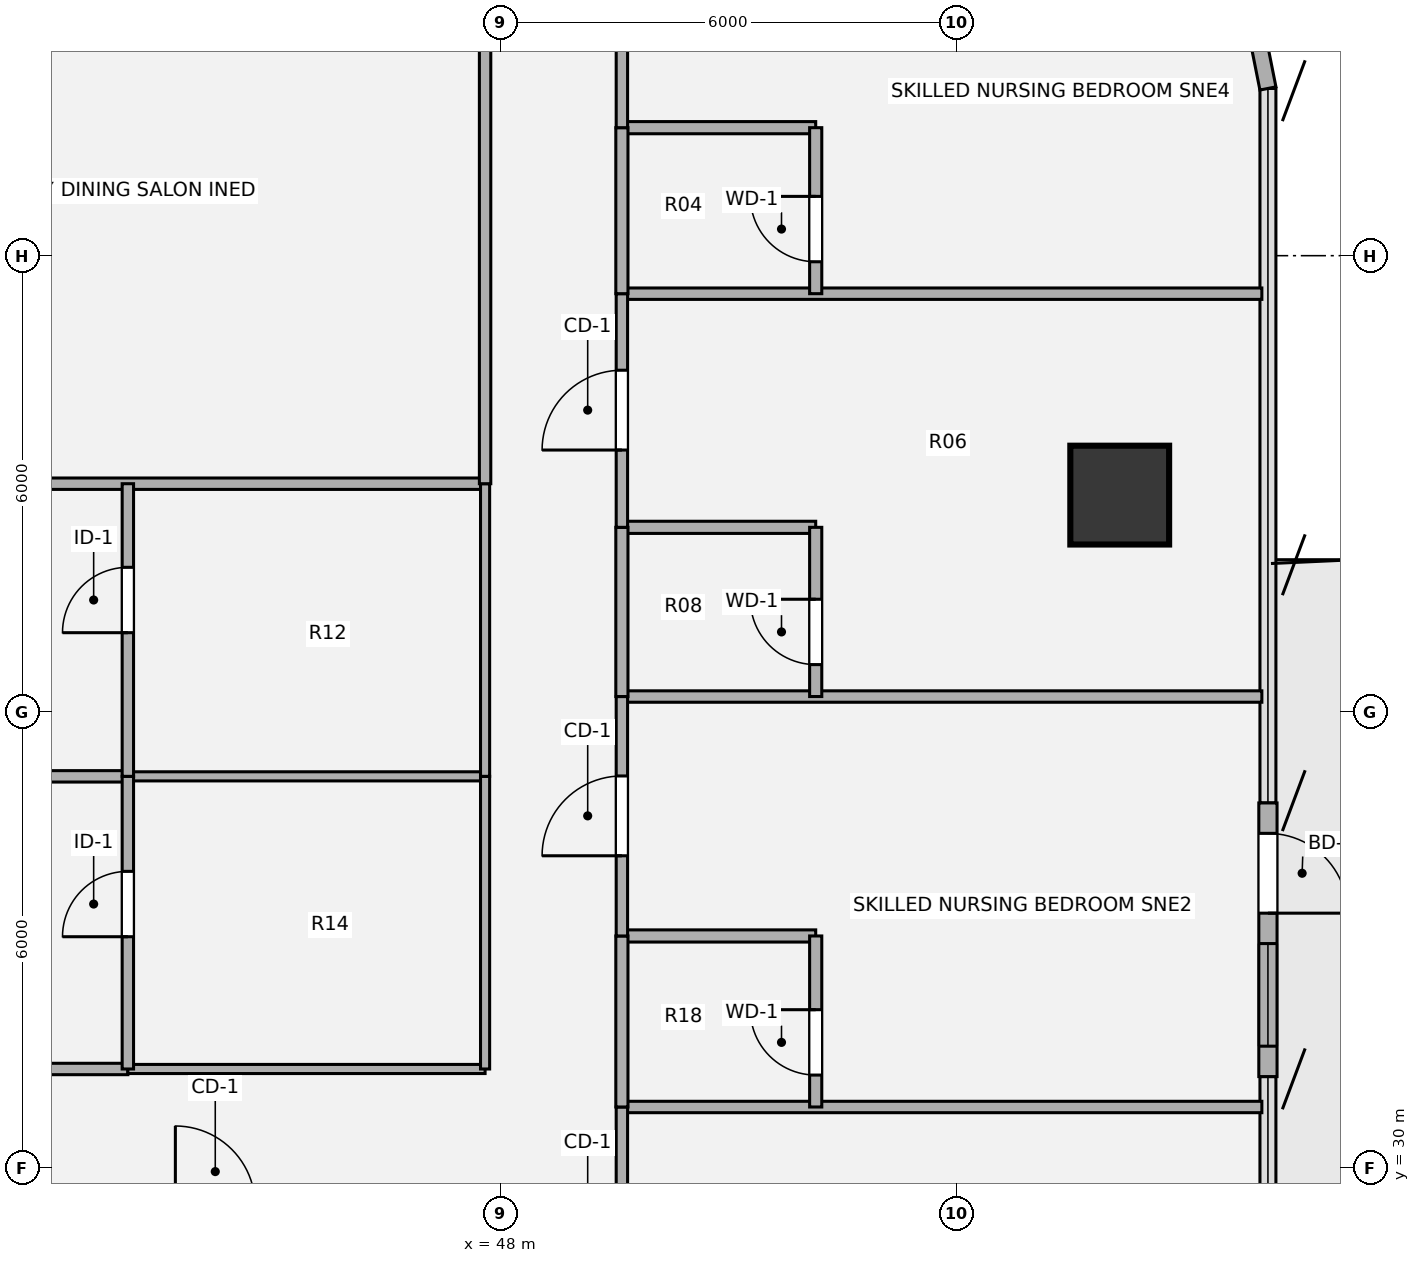
"""IFC4 building model, lengths in metres.
Left out: names, types, materials, properties, quantities, classifications, styles, units other than length and angle.
Written with IfcOpenShell. Run it as: python <this file> out.ifc"""

import sys

from ifc_helpers import new_model, si_unit, direction, frame, frame_2d, origin, origin_2d, place, context, subcontext, project, spatial, rectangle, hollow_circle, extrude, source, transform, mapped, element, fill, save


model = new_model("IFC4")
c1 = context("Model", 3, precision=1e-05, world=origin(), true_north=direction((0.0, 1.0)))
c2 = subcontext(c1, "Body", "Model", "MODEL_VIEW")
j1 = project(units=[si_unit("LENGTHUNIT", "METRE"), si_unit("PLANEANGLEUNIT", "RADIAN")], contexts=[c1])
p1 = place(None, origin())
s1 = spatial("IfcSite", under=j1, at=p1, CompositionType="ELEMENT")
p2 = place(p1, origin())
s2 = spatial("IfcBuilding", under=s1, at=p2, CompositionType="ELEMENT")
p3 = place(p2, frame((0.0, 0.0, 131.4)))
s3 = spatial("IfcBuildingStorey", under=s2, at=p3, CompositionType="ELEMENT", Elevation=131.4)
m1 = source(origin(), c2, "Body", "SweptSolid", [
    extrude(hollow_circle(Radius=0.65, WallThickness=0.045, at=origin_2d()), origin(), (0.0, 0.0, 1.0), 3.78),
])
p4 = place(p3, frame((56.15, 38.85, 0.0), z_axis=(0.0, 0.0, 1.0), x_axis=(1.0, 0.0, 0.0)))
e1 = element("IfcColumn", 1, at=p4, inside=s3, PredefinedType="COLUMN", context=c2, shape_type="MappedRepresentation", body=[
    mapped(m1, transform((0.0, 0.0, 0.0), x_axis=(1.0, 0.0, 0.0), y_axis=(0.0, 1.0, 0.0), z_axis=(0.0, 0.0, 1.0), scale=1.0)),
])
p5 = place(p3, frame((57.856, 45.425, 0.0), z_axis=(0.0, 0.0, 1.0), x_axis=(0.195138390419, -0.980775717779, 0.0)))
e2 = element("IfcWall", 2, at=p5, inside=s3, PredefinedType="SOLIDWALL", context=c2, shape_type="SweptSolid", body=[
    extrude(rectangle(XDim=1.249, YDim=0.215, at=frame_2d((0.624, 0.0))), origin(), (0.0, 0.0, 1.0), 3.53),
])
p6 = place(p3, frame((58.1, 34.8, 0.0), z_axis=(0.0, 0.0, 1.0), x_axis=(0.0, -1.0, 0.0)))
e3 = element("IfcWall", 3, at=p6, inside=s3, PredefinedType="SOLIDWALL", context=c2, shape_type="SweptSolid", body=[
    extrude(rectangle(XDim=3.6, YDim=0.24, at=frame_2d((1.8, 0.0))), origin(), (0.0, 0.0, 1.0), 3.53),
])
p7 = place(p6, frame((0.4, 0.0, 0.0)))
e4 = element("IfcOpeningElement", 4, at=p7, cuts=e3, PredefinedType="OPENING", context=c2, shape_type="SweptSolid", body=[
    extrude(rectangle(XDim=1.05, YDim=2.15, at=origin_2d()), frame((0.525, 0.13, 1.075), z_axis=(0.0, -1.0, 0.0), x_axis=(1.0, 0.0, 0.0)), (0.0, 0.0, 1.0), 0.26),
])
p8 = place(p6, frame((1.85, 0.0, 0.85)))
e5 = element("IfcOpeningElement", 5, at=p8, cuts=e3, PredefinedType="OPENING", context=c2, shape_type="SweptSolid", body=[
    extrude(rectangle(XDim=1.35, YDim=1.35, at=origin_2d()), frame((0.675, 0.13, 0.675), z_axis=(0.0, -1.0, 0.0), x_axis=(1.0, 0.0, 0.0)), (0.0, 0.0, 1.0), 0.26),
])
p9 = place(p3, frame((49.6, 30.8, 0.0), z_axis=(0.0, 0.0, 1.0), x_axis=(1.0, 0.0, 0.0)))
e6 = element("IfcWall", 6, at=p9, inside=s3, PredefinedType="PARTITIONING", context=c2, shape_type="SweptSolid", body=[
    extrude(rectangle(XDim=8.42, YDim=0.15, at=frame_2d((4.21, 0.0))), origin(), (0.0, 0.0, 1.0), 2.982),
])
p10 = place(p3, frame((36.9, 31.3, 0.0), z_axis=(0.0, 0.0, 1.0), x_axis=(1.0, 0.0, 0.0)))
e7 = element("IfcWall", 7, at=p10, inside=s3, PredefinedType="PARTITIONING", context=c2, shape_type="SweptSolid", body=[
    extrude(rectangle(XDim=6.2, YDim=0.15, at=frame_2d((3.1, 0.0))), origin(), (0.0, 0.0, 1.0), 2.982),
])
p11 = place(p3, frame((43.1, 31.3, 0.0), z_axis=(0.0, 0.0, 1.0), x_axis=(1.0, 0.0, 0.0)))
e8 = element("IfcWall", 8, at=p11, inside=s3, PredefinedType="PARTITIONING", context=c2, shape_type="SweptSolid", body=[
    extrude(rectangle(XDim=4.7, YDim=0.12, at=frame_2d((2.35, 0.0))), origin(), (0.0, 0.0, 1.0), 2.982),
])
p12 = place(p3, frame((49.6, 33.05, 0.0), z_axis=(0.0, 0.0, 1.0), x_axis=(1.0, 0.0, 0.0)))
e9 = element("IfcWall", 9, at=p12, inside=s3, PredefinedType="PLUMBINGWALL", context=c2, shape_type="SweptSolid", body=[
    extrude(rectangle(XDim=2.55, YDim=0.16, at=frame_2d((1.275, 0.0))), origin(), (0.0, 0.0, 1.0), 2.982),
])
p13 = place(p3, frame((36.9, 35.15, 0.0), z_axis=(0.0, 0.0, 1.0), x_axis=(1.0, 0.0, 0.0)))
e10 = element("IfcWall", 10, at=p13, inside=s3, PredefinedType="PARTITIONING", context=c2, shape_type="SweptSolid", body=[
    extrude(rectangle(XDim=6.2, YDim=0.15, at=frame_2d((3.1, 0.0))), origin(), (0.0, 0.0, 1.0), 2.982),
])
p14 = place(p3, frame((43.1, 35.15, 0.0), z_axis=(0.0, 0.0, 1.0), x_axis=(1.0, 0.0, 0.0)))
e11 = element("IfcWall", 11, at=p14, inside=s3, PredefinedType="PARTITIONING", context=c2, shape_type="SweptSolid", body=[
    extrude(rectangle(XDim=4.7, YDim=0.12, at=frame_2d((2.35, 0.0))), origin(), (0.0, 0.0, 1.0), 2.982),
])
p15 = place(p3, frame((49.6, 36.2, 0.0), z_axis=(0.0, 0.0, 1.0), x_axis=(1.0, 0.0, 0.0)))
e12 = element("IfcWall", 12, at=p15, inside=s3, PredefinedType="PARTITIONING", context=c2, shape_type="SweptSolid", body=[
    extrude(rectangle(XDim=8.42, YDim=0.15, at=frame_2d((4.21, 0.0))), origin(), (0.0, 0.0, 1.0), 2.982),
])
p16 = place(p3, frame((49.6, 38.426, 0.0), z_axis=(0.0, 0.0, 1.0), x_axis=(1.0, 0.0, 0.0)))
e13 = element("IfcWall", 13, at=p16, inside=s3, PredefinedType="PLUMBINGWALL", context=c2, shape_type="SweptSolid", body=[
    extrude(rectangle(XDim=2.55, YDim=0.16, at=frame_2d((1.275, 0.0))), origin(), (0.0, 0.0, 1.0), 3.055),
])
p17 = place(p3, frame((36.9, 39.0, 0.0), z_axis=(0.0, 0.0, 1.0), x_axis=(1.0, 0.0, 0.0)))
e14 = element("IfcWall", 14, at=p17, inside=s3, PredefinedType="PARTITIONING", context=c2, shape_type="SweptSolid", body=[
    extrude(rectangle(XDim=10.9, YDim=0.15, at=frame_2d((5.45, 0.0))), origin(), (0.0, 0.0, 1.0), 2.903),
])
p18 = place(p3, frame((49.6, 41.5, 0.0), z_axis=(0.0, 0.0, 1.0), x_axis=(1.0, 0.0, 0.0)))
e15 = element("IfcWall", 15, at=p18, inside=s3, PredefinedType="PARTITIONING", context=c2, shape_type="SweptSolid", body=[
    extrude(rectangle(XDim=8.42, YDim=0.15, at=frame_2d((4.21, 0.0))), origin(), (0.0, 0.0, 1.0), 3.5),
])
p19 = place(p3, frame((49.6, 43.684, 0.0), z_axis=(0.0, 0.0, 1.0), x_axis=(1.0, 0.0, 0.0)))
e16 = element("IfcWall", 16, at=p19, inside=s3, PredefinedType="PLUMBINGWALL", context=c2, shape_type="SweptSolid", body=[
    extrude(rectangle(XDim=2.55, YDim=0.16, at=frame_2d((1.275, 0.0))), origin(), (0.0, 0.0, 1.0), 3.5),
])
p20 = place(p3, frame((43.1, 31.3, 0.0), z_axis=(0.0, 0.0, 1.0), x_axis=(0.0, 1.0, 0.0)))
e17 = element("IfcWall", 17, at=p20, inside=s3, PredefinedType="PARTITIONING", context=c2, shape_type="SweptSolid", body=[
    extrude(rectangle(XDim=3.85, YDim=0.15, at=frame_2d((1.925, 0.0))), origin(), (0.0, 0.0, 1.0), 3.5),
])
p21 = place(p20, frame((1.74, 0.0, 0.0)))
e18 = element("IfcOpeningElement", 18, at=p21, cuts=e17, PredefinedType="OPENING", context=c2, shape_type="SweptSolid", body=[
    extrude(rectangle(XDim=0.86, YDim=2.1, at=origin_2d()), frame((0.43, 0.085, 1.05), z_axis=(0.0, -1.0, 0.0), x_axis=(1.0, 0.0, 0.0)), (0.0, 0.0, 1.0), 0.17),
])
p22 = place(p3, frame((43.1, 35.15, 0.0), z_axis=(0.0, 0.0, 1.0), x_axis=(0.0, 1.0, 0.0)))
e19 = element("IfcWall", 19, at=p22, inside=s3, PredefinedType="PARTITIONING", context=c2, shape_type="SweptSolid", body=[
    extrude(rectangle(XDim=3.85, YDim=0.15, at=frame_2d((1.925, 0.0))), origin(), (0.0, 0.0, 1.0), 3.5),
])
p23 = place(p22, frame((1.89, 0.0, 0.0)))
e20 = element("IfcOpeningElement", 20, at=p23, cuts=e19, PredefinedType="OPENING", context=c2, shape_type="SweptSolid", body=[
    extrude(rectangle(XDim=0.86, YDim=2.1, at=origin_2d()), frame((0.43, 0.085, 1.05), z_axis=(0.0, -1.0, 0.0), x_axis=(1.0, 0.0, 0.0)), (0.0, 0.0, 1.0), 0.17),
])
p24 = place(p3, frame((47.8, 31.3, 0.0), z_axis=(0.0, 0.0, 1.0), x_axis=(0.0, 1.0, 0.0)))
e21 = element("IfcWall", 21, at=p24, inside=s3, PredefinedType="PARTITIONING", context=c2, shape_type="SweptSolid", body=[
    extrude(rectangle(XDim=3.85, YDim=0.12, at=frame_2d((1.925, 0.0))), origin(), (0.0, 0.0, 1.0), 3.5),
])
p25 = place(p3, frame((47.8, 35.15, 0.0), z_axis=(0.0, 0.0, 1.0), x_axis=(0.0, 1.0, 0.0)))
e22 = element("IfcWall", 22, at=p25, inside=s3, PredefinedType="PARTITIONING", context=c2, shape_type="SweptSolid", body=[
    extrude(rectangle(XDim=3.85, YDim=0.12, at=frame_2d((1.925, 0.0))), origin(), (0.0, 0.0, 1.0), 3.5),
])
p26 = place(p3, frame((47.8, 39.0, 0.0), z_axis=(0.0, 0.0, 1.0), x_axis=(0.0, 1.0, 0.0)))
e23 = element("IfcWall", 23, at=p26, inside=s3, PredefinedType="PARTITIONING", context=c2, shape_type="SweptSolid", body=[
    extrude(rectangle(XDim=8.321, YDim=0.15, at=frame_2d((4.16, 0.0))), origin(), (0.0, 0.0, 1.0), 3.5),
])
p27 = place(p3, frame((49.6, 27.65, 0.0), z_axis=(0.0, 0.0, 1.0), x_axis=(0.0, 1.0, 0.0)))
e24 = element("IfcWall", 24, at=p27, inside=s3, PredefinedType="PARTITIONING", context=c2, shape_type="SweptSolid", body=[
    extrude(rectangle(XDim=3.15, YDim=0.15, at=frame_2d((1.575, 0.0))), origin(), (0.0, 0.0, 1.0), 3.5),
])
p28 = place(p27, frame((1.055, 0.0, 0.0)))
e25 = element("IfcOpeningElement", 25, at=p28, cuts=e24, PredefinedType="OPENING", context=c2, shape_type="SweptSolid", body=[
    extrude(rectangle(XDim=1.05, YDim=2.1, at=origin_2d()), frame((0.525, 0.085, 1.05), z_axis=(0.0, -1.0, 0.0), x_axis=(1.0, 0.0, 0.0)), (0.0, 0.0, 1.0), 0.17),
])
p29 = place(p3, frame((49.6, 30.8, 0.0), z_axis=(0.0, 0.0, 1.0), x_axis=(0.0, 1.0, 0.0)))
e26 = element("IfcWall", 26, at=p29, inside=s3, PredefinedType="PLUMBINGWALL", context=c2, shape_type="SweptSolid", body=[
    extrude(rectangle(XDim=2.25, YDim=0.16, at=frame_2d((1.125, 0.0))), origin(), (0.0, 0.0, 1.0), 3.5),
])
p30 = place(p3, frame((49.6, 33.05, 0.0), z_axis=(0.0, 0.0, 1.0), x_axis=(0.0, 1.0, 0.0)))
e27 = element("IfcWall", 27, at=p30, inside=s3, PredefinedType="PARTITIONING", context=c2, shape_type="SweptSolid", body=[
    extrude(rectangle(XDim=3.15, YDim=0.15, at=frame_2d((1.575, 0.0))), origin(), (0.0, 0.0, 1.0), 3.5),
])
p31 = place(p30, frame((1.055, 0.0, 0.0)))
e28 = element("IfcOpeningElement", 28, at=p31, cuts=e27, PredefinedType="OPENING", context=c2, shape_type="SweptSolid", body=[
    extrude(rectangle(XDim=1.05, YDim=2.1, at=origin_2d()), frame((0.525, 0.085, 1.05), z_axis=(0.0, -1.0, 0.0), x_axis=(1.0, 0.0, 0.0)), (0.0, 0.0, 1.0), 0.17),
])
p32 = place(p3, frame((49.6, 36.2, 0.0), z_axis=(0.0, 0.0, 1.0), x_axis=(0.0, 1.0, 0.0)))
e29 = element("IfcWall", 29, at=p32, inside=s3, PredefinedType="PLUMBINGWALL", context=c2, shape_type="SweptSolid", body=[
    extrude(rectangle(XDim=2.226, YDim=0.16, at=frame_2d((1.113, 0.0))), origin(), (0.0, 0.0, 1.0), 3.5),
])
p33 = place(p3, frame((49.6, 38.426, 0.0), z_axis=(0.0, 0.0, 1.0), x_axis=(0.0, 1.0, 0.0)))
e30 = element("IfcWall", 30, at=p33, inside=s3, PredefinedType="PARTITIONING", context=c2, shape_type="SweptSolid", body=[
    extrude(rectangle(XDim=3.074, YDim=0.15, at=frame_2d((1.537, 0.0))), origin(), (0.0, 0.0, 1.0), 3.5),
])
p34 = place(p33, frame((1.017, 0.0, 0.0)))
e31 = element("IfcOpeningElement", 31, at=p34, cuts=e30, PredefinedType="OPENING", context=c2, shape_type="SweptSolid", body=[
    extrude(rectangle(XDim=1.05, YDim=2.1, at=origin_2d()), frame((0.525, 0.085, 1.05), z_axis=(0.0, -1.0, 0.0), x_axis=(1.0, 0.0, 0.0)), (0.0, 0.0, 1.0), 0.17),
])
p35 = place(p3, frame((49.6, 41.5, 0.0), z_axis=(0.0, 0.0, 1.0), x_axis=(0.0, 1.0, 0.0)))
e32 = element("IfcWall", 32, at=p35, inside=s3, PredefinedType="PLUMBINGWALL", context=c2, shape_type="SweptSolid", body=[
    extrude(rectangle(XDim=2.184, YDim=0.16, at=frame_2d((1.092, 0.0))), origin(), (0.0, 0.0, 1.0), 3.5),
])
p36 = place(p3, frame((49.6, 43.684, 0.0), z_axis=(0.0, 0.0, 1.0), x_axis=(0.0, 1.0, 0.0)))
e33 = element("IfcWall", 33, at=p36, inside=s3, PredefinedType="PARTITIONING", context=c2, shape_type="SweptSolid", body=[
    extrude(rectangle(XDim=3.637, YDim=0.15, at=frame_2d((1.818, 0.0))), origin(), (0.0, 0.0, 1.0), 3.5),
])
p37 = place(p36, frame((1.298, 0.0, 0.0)))
e34 = element("IfcOpeningElement", 34, at=p37, cuts=e33, PredefinedType="OPENING", context=c2, shape_type="SweptSolid", body=[
    extrude(rectangle(XDim=1.05, YDim=2.1, at=origin_2d()), frame((0.525, 0.085, 1.05), z_axis=(0.0, -1.0, 0.0), x_axis=(1.0, 0.0, 0.0)), (0.0, 0.0, 1.0), 0.17),
])
p38 = place(p3, frame((52.15, 30.8, 0.0), z_axis=(0.0, 0.0, 1.0), x_axis=(0.0, 1.0, 0.0)))
e35 = element("IfcWall", 35, at=p38, inside=s3, PredefinedType="PLUMBINGWALL", context=c2, shape_type="SweptSolid", body=[
    extrude(rectangle(XDim=2.25, YDim=0.16, at=frame_2d((1.125, 0.0))), origin(), (0.0, 0.0, 1.0), 3.5),
])
p39 = place(p38, frame((0.42, 0.0, 0.0)))
e36 = element("IfcOpeningElement", 36, at=p39, cuts=e35, PredefinedType="OPENING", context=c2, shape_type="SweptSolid", body=[
    extrude(rectangle(XDim=0.86, YDim=2.1, at=origin_2d()), frame((0.43, 0.09, 1.05), z_axis=(0.0, -1.0, 0.0), x_axis=(1.0, 0.0, 0.0)), (0.0, 0.0, 1.0), 0.18),
])
p40 = place(p3, frame((52.15, 36.2, 0.0), z_axis=(0.0, 0.0, 1.0), x_axis=(0.0, 1.0, 0.0)))
e37 = element("IfcWall", 37, at=p40, inside=s3, PredefinedType="PLUMBINGWALL", context=c2, shape_type="SweptSolid", body=[
    extrude(rectangle(XDim=2.226, YDim=0.16, at=frame_2d((1.113, 0.0))), origin(), (0.0, 0.0, 1.0), 3.5),
])
p41 = place(p40, frame((0.42, 0.0, 0.0)))
e38 = element("IfcOpeningElement", 38, at=p41, cuts=e37, PredefinedType="OPENING", context=c2, shape_type="SweptSolid", body=[
    extrude(rectangle(XDim=0.86, YDim=2.1, at=origin_2d()), frame((0.43, 0.09, 1.05), z_axis=(0.0, -1.0, 0.0), x_axis=(1.0, 0.0, 0.0)), (0.0, 0.0, 1.0), 0.18),
])
p42 = place(p3, frame((52.15, 41.5, 0.0), z_axis=(0.0, 0.0, 1.0), x_axis=(0.0, 1.0, 0.0)))
e39 = element("IfcWall", 39, at=p42, inside=s3, PredefinedType="PLUMBINGWALL", context=c2, shape_type="SweptSolid", body=[
    extrude(rectangle(XDim=2.184, YDim=0.16, at=frame_2d((1.092, 0.0))), origin(), (0.0, 0.0, 1.0), 3.5),
])
p43 = place(p42, frame((0.42, 0.0, 0.0)))
e40 = element("IfcOpeningElement", 40, at=p43, cuts=e39, PredefinedType="OPENING", context=c2, shape_type="SweptSolid", body=[
    extrude(rectangle(XDim=0.86, YDim=2.1, at=origin_2d()), frame((0.43, 0.09, 1.05), z_axis=(0.0, -1.0, 0.0), x_axis=(1.0, 0.0, 0.0)), (0.0, 0.0, 1.0), 0.18),
])
m2 = source(origin(), c2, "Body", "SweptSolid", [
    extrude(rectangle(XDim=1.05, YDim=2.15, at=origin_2d()), frame((0.525, 0.025, 1.075), z_axis=(0.0, -1.0, 0.0), x_axis=(1.0, 0.0, 0.0)), (0.0, 0.0, 1.0), 0.05),
])
p44 = place(p7, origin())
e41 = element("IfcDoor", 41, at=p44, inside=s3, OperationType="SINGLE_SWING_RIGHT", PredefinedType="DOOR", context=c2, shape_type="MappedRepresentation", body=[
    mapped(m2, transform((0.0, 0.0, 0.0), x_axis=(1.0, 0.0, 0.0), y_axis=(0.0, 1.0, 0.0), z_axis=(0.0, 0.0, 1.0), scale=1.0)),
])
fill(e4, e41)
m3 = source(origin(), c2, "Body", "SweptSolid", [
    extrude(rectangle(XDim=1.35, YDim=1.35, at=origin_2d()), frame((0.675, 0.03, 0.675), z_axis=(0.0, -1.0, 0.0), x_axis=(1.0, 0.0, 0.0)), (0.0, 0.0, 1.0), 0.06),
])
p45 = place(p8, origin())
e42 = element("IfcWindow", 42, at=p45, inside=s3, PartitioningType="SINGLE_PANEL", PredefinedType="WINDOW", context=c2, shape_type="MappedRepresentation", body=[
    mapped(m3, transform((0.0, 0.0, 0.0), x_axis=(1.0, 0.0, 0.0), y_axis=(0.0, 1.0, 0.0), z_axis=(0.0, 0.0, 1.0), scale=1.0)),
])
fill(e5, e42)
m4 = source(origin(), c2, "Body", "SweptSolid", [
    extrude(rectangle(XDim=0.86, YDim=2.1, at=origin_2d()), frame((0.43, 0.025, 1.05), z_axis=(0.0, -1.0, 0.0), x_axis=(1.0, 0.0, 0.0)), (0.0, 0.0, 1.0), 0.05),
])
p46 = place(p21, origin())
e43 = element("IfcDoor", 43, at=p46, inside=s3, OperationType="SINGLE_SWING_LEFT", PredefinedType="DOOR", context=c2, shape_type="MappedRepresentation", body=[
    mapped(m4, transform((0.0, 0.0, 0.0), x_axis=(1.0, 0.0, 0.0), y_axis=(0.0, 1.0, 0.0), z_axis=(0.0, 0.0, 1.0), scale=1.0)),
])
fill(e18, e43)
p47 = place(p23, origin())
e44 = element("IfcDoor", 44, at=p47, inside=s3, OperationType="SINGLE_SWING_LEFT", PredefinedType="DOOR", context=c2, shape_type="MappedRepresentation", body=[
    mapped(m4, transform((0.0, 0.0, 0.0), x_axis=(1.0, 0.0, 0.0), y_axis=(0.0, 1.0, 0.0), z_axis=(0.0, 0.0, 1.0), scale=1.0)),
])
fill(e20, e44)
m5 = source(origin(), c2, "Body", "SweptSolid", [
    extrude(rectangle(XDim=1.05, YDim=2.1, at=origin_2d()), frame((0.525, 0.025, 1.05), z_axis=(0.0, -1.0, 0.0), x_axis=(1.0, 0.0, 0.0)), (0.0, 0.0, 1.0), 0.05),
])
p48 = place(p31, origin())
e45 = element("IfcDoor", 45, at=p48, inside=s3, OperationType="SINGLE_SWING_LEFT", PredefinedType="DOOR", context=c2, shape_type="MappedRepresentation", body=[
    mapped(m5, transform((0.0, 0.0, 0.0), x_axis=(1.0, 0.0, 0.0), y_axis=(0.0, 1.0, 0.0), z_axis=(0.0, 0.0, 1.0), scale=1.0)),
])
fill(e28, e45)
p49 = place(p34, origin())
e46 = element("IfcDoor", 46, at=p49, inside=s3, OperationType="SINGLE_SWING_LEFT", PredefinedType="DOOR", context=c2, shape_type="MappedRepresentation", body=[
    mapped(m5, transform((0.0, 0.0, 0.0), x_axis=(1.0, 0.0, 0.0), y_axis=(0.0, 1.0, 0.0), z_axis=(0.0, 0.0, 1.0), scale=1.0)),
])
fill(e31, e46)
m6 = source(origin(), c2, "Body", "SweptSolid", [
    extrude(rectangle(XDim=0.86, YDim=2.1, at=origin_2d()), frame((0.43, 0.025, 1.05), z_axis=(0.0, -1.0, 0.0), x_axis=(1.0, 0.0, 0.0)), (0.0, 0.0, 1.0), 0.05),
])
p50 = place(p39, origin())
e47 = element("IfcDoor", 47, at=p50, inside=s3, OperationType="SINGLE_SWING_RIGHT", PredefinedType="DOOR", context=c2, shape_type="MappedRepresentation", body=[
    mapped(m6, transform((0.0, 0.0, 0.0), x_axis=(1.0, 0.0, 0.0), y_axis=(0.0, 1.0, 0.0), z_axis=(0.0, 0.0, 1.0), scale=1.0)),
])
fill(e36, e47)
p51 = place(p41, origin())
e48 = element("IfcDoor", 48, at=p51, inside=s3, OperationType="SINGLE_SWING_RIGHT", PredefinedType="DOOR", context=c2, shape_type="MappedRepresentation", body=[
    mapped(m6, transform((0.0, 0.0, 0.0), x_axis=(1.0, 0.0, 0.0), y_axis=(0.0, 1.0, 0.0), z_axis=(0.0, 0.0, 1.0), scale=1.0)),
])
fill(e38, e48)
p52 = place(p43, origin())
e49 = element("IfcDoor", 49, at=p52, inside=s3, OperationType="SINGLE_SWING_RIGHT", PredefinedType="DOOR", context=c2, shape_type="MappedRepresentation", body=[
    mapped(m6, transform((0.0, 0.0, 0.0), x_axis=(1.0, 0.0, 0.0), y_axis=(0.0, 1.0, 0.0), z_axis=(0.0, 0.0, 1.0), scale=1.0)),
])
fill(e40, e49)
save(model, sys.argv[1])
